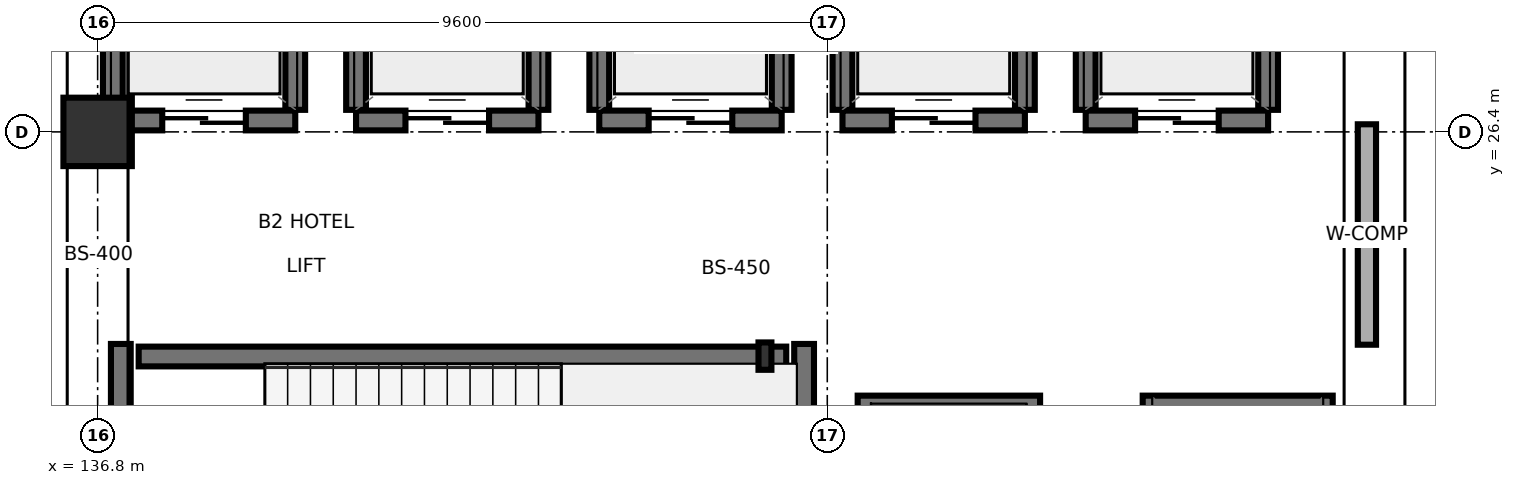
"""IFC4 building model, lengths in metres.
Left out: names, types, materials, properties, quantities, classifications, styles, units other than length and angle.
Written with IfcOpenShell. Run it as: python <this file> out.ifc"""

import sys

from ifc_helpers import new_model, si_unit, direction, frame, frame_2d, origin, origin_2d, place, context, subcontext, project, spatial, rectangle, i_section, extrude, element, fill, save


model = new_model("IFC4")
c1 = context("Model", 3, precision=1e-05, world=origin(), true_north=direction((0.0, 1.0)))
c2 = subcontext(c1, "Body", "Model", "MODEL_VIEW")
j1 = project(units=[si_unit("LENGTHUNIT", "METRE"), si_unit("PLANEANGLEUNIT", "RADIAN")], contexts=[c1])
p1 = place(None, origin())
s1 = spatial("IfcSite", under=j1, at=p1, CompositionType="ELEMENT")
p2 = place(p1, origin())
s2 = spatial("IfcBuilding", under=s1, at=p2, CompositionType="ELEMENT")
p3 = place(p2, frame((0.0, 0.0, -8.4)))
s3 = spatial("IfcBuildingStorey", under=s2, at=p3, CompositionType="ELEMENT", Elevation=-8.4)
p4 = place(p3, frame((136.8, 26.4, 0.0), z_axis=(0.0, 0.0, 1.0), x_axis=(1.0, 0.0, 0.0)))
e1 = element("IfcColumn", 1, at=p4, inside=s3, PredefinedType="COLUMN", context=c2, shape_type="SweptSolid", body=[
    extrude(rectangle(XDim=0.9, YDim=0.9, at=origin_2d()), origin(), (0.0, 0.0, 1.0), 4.2),
])
p5 = place(p3, frame((145.58, 23.45, 0.0), z_axis=(0.0, 0.0, 1.0), x_axis=(1.0, 0.0, 0.0)))
e2 = element("IfcColumn", 2, at=p5, inside=s3, PredefinedType="PILASTER", context=c2, shape_type="SweptSolid", body=[
    extrude(i_section(OverallWidth=0.17, OverallDepth=0.36, WebThickness=0.008, FlangeThickness=0.013, FilletRadius=0.018, at=origin_2d()), origin(), (0.0, 0.0, 1.0), 4.2),
])
p6 = place(p3, frame((137.105, 19.34, 0.0), z_axis=(0.0, 0.0, 1.0), x_axis=(0.0, 1.0, 0.0)))
e3 = element("IfcWall", 3, at=p6, inside=s3, PredefinedType="SHEAR", context=c2, shape_type="SweptSolid", body=[
    extrude(rectangle(XDim=4.27, YDim=0.26, at=frame_2d((2.135, 0.0))), origin(), (0.0, 0.0, 1.0), 3.93),
])
p7 = place(p6, frame((0.61, 0.0, 0.0)))
e4 = element("IfcOpeningElement", 4, at=p7, cuts=e3, PredefinedType="OPENING", context=c2, shape_type="SweptSolid", body=[
    extrude(rectangle(XDim=1.1, YDim=2.2, at=frame_2d((0.55, 1.1))), frame((0.0, 0.14, 0.0), z_axis=(0.0, -1.0, 0.0), x_axis=(1.0, 0.0, 0.0)), (0.0, 0.0, 1.0), 0.28),
])
p8 = place(p3, frame((146.095, 19.34, 0.0), z_axis=(0.0, 0.0, 1.0), x_axis=(0.0, 1.0, 0.0)))
e5 = element("IfcWall", 5, at=p8, inside=s3, PredefinedType="SHEAR", context=c2, shape_type="SweptSolid", body=[
    extrude(rectangle(XDim=4.27, YDim=0.26, at=frame_2d((2.135, 0.0))), origin(), (0.0, 0.0, 1.0), 3.93),
])
p9 = place(p3, frame((137.34, 23.445, 0.0), z_axis=(0.0, 0.0, 1.0), x_axis=(1.0, 0.0, 0.0)))
e6 = element("IfcWall", 6, at=p9, inside=s3, PredefinedType="SHEAR", context=c2, shape_type="SweptSolid", body=[
    extrude(rectangle(XDim=8.52, YDim=0.26, at=frame_2d((4.26, 0.0))), origin(), (0.0, 0.0, 1.0), 3.93),
])
p10 = place(p3, frame((137.0, 26.55, -0.95), z_axis=(0.0, 0.0, 1.0), x_axis=(1.0, 0.0, 0.0)))
e7 = element("IfcWall", 7, at=p10, inside=s3, PredefinedType="SHEAR", context=c2, shape_type="SweptSolid", body=[
    extrude(rectangle(XDim=2.4, YDim=0.26, at=frame_2d((1.2, 0.0))), origin(), (0.0, 0.0, 1.0), 4.365),
])
p11 = place(p10, frame((0.65, 0.0, 0.95)))
e8 = element("IfcOpeningElement", 8, at=p11, cuts=e7, PredefinedType="OPENING", context=c2, shape_type="SweptSolid", body=[
    extrude(rectangle(XDim=1.1, YDim=2.2, at=frame_2d((0.55, 1.1))), frame((0.0, 0.14, 0.0), z_axis=(0.0, -1.0, 0.0), x_axis=(1.0, 0.0, 0.0)), (0.0, 0.0, 1.0), 0.28),
])
for number, where, z_axis, x_axis in (
    (9, (137.0, 26.69, -0.95), (0.0, 0.0, 1.0), (0.0, 1.0, 0.0)),
    (10, (139.4, 26.69, -0.95), (0.0, 0.0, 1.0), (0.0, 1.0, 0.0)),
):
    element("IfcWall", number, at=place(p3, frame(where, z_axis=z_axis, x_axis=x_axis)), inside=s3, PredefinedType="SHEAR", context=c2, shape_type="SweptSolid", body=[
        extrude(rectangle(XDim=1.82, YDim=0.26, at=frame_2d((0.91, 0.0))), origin(), (0.0, 0.0, 1.0), 4.365),
    ])
p12 = place(p3, frame((140.2, 26.55, -0.95), z_axis=(0.0, 0.0, 1.0), x_axis=(1.0, 0.0, 0.0)))
e11 = element("IfcWall", 11, at=p12, inside=s3, PredefinedType="SHEAR", context=c2, shape_type="SweptSolid", body=[
    extrude(rectangle(XDim=2.4, YDim=0.26, at=frame_2d((1.2, 0.0))), origin(), (0.0, 0.0, 1.0), 4.88),
])
p13 = place(p12, frame((0.65, 0.0, 0.95)))
e12 = element("IfcOpeningElement", 12, at=p13, cuts=e11, PredefinedType="OPENING", context=c2, shape_type="SweptSolid", body=[
    extrude(rectangle(XDim=1.1, YDim=2.2, at=frame_2d((0.55, 1.1))), frame((0.0, 0.14, 0.0), z_axis=(0.0, -1.0, 0.0), x_axis=(1.0, 0.0, 0.0)), (0.0, 0.0, 1.0), 0.28),
])
for number, where, z_axis, x_axis in (
    (13, (140.2, 26.69, -0.95), (0.0, 0.0, 1.0), (0.0, 1.0, 0.0)),
    (14, (142.6, 26.69, -0.95), (0.0, 0.0, 1.0), (0.0, 1.0, 0.0)),
):
    element("IfcWall", number, at=place(p3, frame(where, z_axis=z_axis, x_axis=x_axis)), inside=s3, PredefinedType="SHEAR", context=c2, shape_type="SweptSolid", body=[
        extrude(rectangle(XDim=1.82, YDim=0.26, at=frame_2d((0.91, 0.0))), origin(), (0.0, 0.0, 1.0), 4.88),
    ])
p14 = place(p3, frame((143.4, 26.55, -0.95), z_axis=(0.0, 0.0, 1.0), x_axis=(1.0, 0.0, 0.0)))
e15 = element("IfcWall", 15, at=p14, inside=s3, PredefinedType="SHEAR", context=c2, shape_type="SweptSolid", body=[
    extrude(rectangle(XDim=2.4, YDim=0.26, at=frame_2d((1.2, 0.0))), origin(), (0.0, 0.0, 1.0), 4.88),
])
p15 = place(p14, frame((0.65, 0.0, 0.95)))
e16 = element("IfcOpeningElement", 16, at=p15, cuts=e15, PredefinedType="OPENING", context=c2, shape_type="SweptSolid", body=[
    extrude(rectangle(XDim=1.1, YDim=2.2, at=frame_2d((0.55, 1.1))), frame((0.0, 0.14, 0.0), z_axis=(0.0, -1.0, 0.0), x_axis=(1.0, 0.0, 0.0)), (0.0, 0.0, 1.0), 0.28),
])
for number, where, z_axis, x_axis in (
    (17, (143.4, 26.69, -0.95), (0.0, 0.0, 1.0), (0.0, 1.0, 0.0)),
    (18, (145.8, 26.69, -0.95), (0.0, 0.0, 1.0), (0.0, 1.0, 0.0)),
):
    element("IfcWall", number, at=place(p3, frame(where, z_axis=z_axis, x_axis=x_axis)), inside=s3, PredefinedType="SHEAR", context=c2, shape_type="SweptSolid", body=[
        extrude(rectangle(XDim=1.82, YDim=0.26, at=frame_2d((0.91, 0.0))), origin(), (0.0, 0.0, 1.0), 4.88),
    ])
p16 = place(p3, frame((146.6, 26.55, -0.95), z_axis=(0.0, 0.0, 1.0), x_axis=(1.0, 0.0, 0.0)))
e19 = element("IfcWall", 19, at=p16, inside=s3, PredefinedType="SHEAR", context=c2, shape_type="SweptSolid", body=[
    extrude(rectangle(XDim=2.4, YDim=0.26, at=frame_2d((1.2, 0.0))), origin(), (0.0, 0.0, 1.0), 4.88),
])
p17 = place(p16, frame((0.65, 0.0, 0.95)))
e20 = element("IfcOpeningElement", 20, at=p17, cuts=e19, PredefinedType="OPENING", context=c2, shape_type="SweptSolid", body=[
    extrude(rectangle(XDim=1.1, YDim=2.2, at=frame_2d((0.55, 1.1))), frame((0.0, 0.14, 0.0), z_axis=(0.0, -1.0, 0.0), x_axis=(1.0, 0.0, 0.0)), (0.0, 0.0, 1.0), 0.28),
])
for number, where, z_axis, x_axis in (
    (21, (146.6, 26.69, -0.95), (0.0, 0.0, 1.0), (0.0, 1.0, 0.0)),
    (22, (149.0, 26.69, -0.95), (0.0, 0.0, 1.0), (0.0, 1.0, 0.0)),
):
    element("IfcWall", number, at=place(p3, frame(where, z_axis=z_axis, x_axis=x_axis)), inside=s3, PredefinedType="SHEAR", context=c2, shape_type="SweptSolid", body=[
        extrude(rectangle(XDim=1.82, YDim=0.26, at=frame_2d((0.91, 0.0))), origin(), (0.0, 0.0, 1.0), 4.88),
    ])
p18 = place(p3, frame((149.8, 26.55, -0.95), z_axis=(0.0, 0.0, 1.0), x_axis=(1.0, 0.0, 0.0)))
e23 = element("IfcWall", 23, at=p18, inside=s3, PredefinedType="SHEAR", context=c2, shape_type="SweptSolid", body=[
    extrude(rectangle(XDim=2.4, YDim=0.26, at=frame_2d((1.2, 0.0))), origin(), (0.0, 0.0, 1.0), 4.88),
])
p19 = place(p18, frame((0.65, 0.0, 0.95)))
e24 = element("IfcOpeningElement", 24, at=p19, cuts=e23, PredefinedType="OPENING", context=c2, shape_type="SweptSolid", body=[
    extrude(rectangle(XDim=1.1, YDim=2.2, at=frame_2d((0.55, 1.1))), frame((0.0, 0.14, 0.0), z_axis=(0.0, -1.0, 0.0), x_axis=(1.0, 0.0, 0.0)), (0.0, 0.0, 1.0), 0.28),
])
for number, where, z_axis, x_axis in (
    (25, (149.8, 26.69, -0.95), (0.0, 0.0, 1.0), (0.0, 1.0, 0.0)),
    (26, (152.2, 26.69, -0.95), (0.0, 0.0, 1.0), (0.0, 1.0, 0.0)),
):
    element("IfcWall", number, at=place(p3, frame(where, z_axis=z_axis, x_axis=x_axis)), inside=s3, PredefinedType="SHEAR", context=c2, shape_type="SweptSolid", body=[
        extrude(rectangle(XDim=1.82, YDim=0.26, at=frame_2d((0.91, 0.0))), origin(), (0.0, 0.0, 1.0), 4.88),
    ])
p20 = place(p3, frame((146.8, 22.8, -0.95), z_axis=(0.0, 0.0, 1.0), x_axis=(1.0, 0.0, 0.0)))
e27 = element("IfcWall", 27, at=p20, inside=s3, PredefinedType="SHEAR", context=c2, shape_type="SweptSolid", body=[
    extrude(rectangle(XDim=2.4, YDim=0.26, at=frame_2d((1.2, 0.0))), origin(), (0.0, 0.0, 1.0), 4.88),
])
p21 = place(p3, frame((150.55, 22.8, -0.95), z_axis=(0.0, 0.0, 1.0), x_axis=(1.0, 0.0, 0.0)))
e28 = element("IfcWall", 28, at=p21, inside=s3, PredefinedType="SHEAR", context=c2, shape_type="SweptSolid", body=[
    extrude(rectangle(XDim=2.5, YDim=0.26, at=frame_2d((1.25, 0.0))), origin(), (0.0, 0.0, 1.0), 4.88),
])
p22 = place(p3, frame((153.5, 23.6, 0.0), z_axis=(0.0, 0.0, 1.0), x_axis=(0.0, 1.0, 0.0)))
e29 = element("IfcWall", 29, at=p22, inside=s3, PredefinedType="SOLIDWALL", context=c2, shape_type="SweptSolid", body=[
    extrude(rectangle(XDim=2.9, YDim=0.24, at=frame_2d((1.45, 0.0))), origin(), (0.0, 0.0, 1.0), 3.93),
])
p23 = place(p11, origin())
e30 = element("IfcDoor", 30, at=p23, inside=s3, OperationType="SLIDING_TO_LEFT", PredefinedType="DOOR", context=c2, shape_type="SweptSolid", body=[
    extrude(rectangle(XDim=1.1, YDim=2.2, at=frame_2d((0.55, 1.1))), frame((0.0, 0.025, 0.0), z_axis=(0.0, -1.0, 0.0), x_axis=(1.0, 0.0, 0.0)), (0.0, 0.0, 1.0), 0.05),
])
fill(e8, e30)
p24 = place(p13, origin())
e31 = element("IfcDoor", 31, at=p24, inside=s3, OperationType="SLIDING_TO_RIGHT", PredefinedType="DOOR", context=c2, shape_type="SweptSolid", body=[
    extrude(rectangle(XDim=1.1, YDim=2.2, at=frame_2d((0.55, 1.1))), frame((0.0, 0.025, 0.0), z_axis=(0.0, -1.0, 0.0), x_axis=(1.0, 0.0, 0.0)), (0.0, 0.0, 1.0), 0.05),
])
fill(e12, e31)
p25 = place(p15, origin())
e32 = element("IfcDoor", 32, at=p25, inside=s3, OperationType="SLIDING_TO_LEFT", PredefinedType="DOOR", context=c2, shape_type="SweptSolid", body=[
    extrude(rectangle(XDim=1.1, YDim=2.2, at=frame_2d((0.55, 1.1))), frame((0.0, 0.025, 0.0), z_axis=(0.0, -1.0, 0.0), x_axis=(1.0, 0.0, 0.0)), (0.0, 0.0, 1.0), 0.05),
])
fill(e16, e32)
p26 = place(p17, origin())
e33 = element("IfcDoor", 33, at=p26, inside=s3, OperationType="SLIDING_TO_RIGHT", PredefinedType="DOOR", context=c2, shape_type="SweptSolid", body=[
    extrude(rectangle(XDim=1.1, YDim=2.2, at=frame_2d((0.55, 1.1))), frame((0.0, 0.025, 0.0), z_axis=(0.0, -1.0, 0.0), x_axis=(1.0, 0.0, 0.0)), (0.0, 0.0, 1.0), 0.05),
])
fill(e20, e33)
p27 = place(p19, origin())
e34 = element("IfcDoor", 34, at=p27, inside=s3, OperationType="SLIDING_TO_LEFT", PredefinedType="DOOR", context=c2, shape_type="SweptSolid", body=[
    extrude(rectangle(XDim=1.1, YDim=2.2, at=frame_2d((0.55, 1.1))), frame((0.0, 0.025, 0.0), z_axis=(0.0, -1.0, 0.0), x_axis=(1.0, 0.0, 0.0)), (0.0, 0.0, 1.0), 0.05),
])
fill(e24, e34)
save(model, sys.argv[1])
